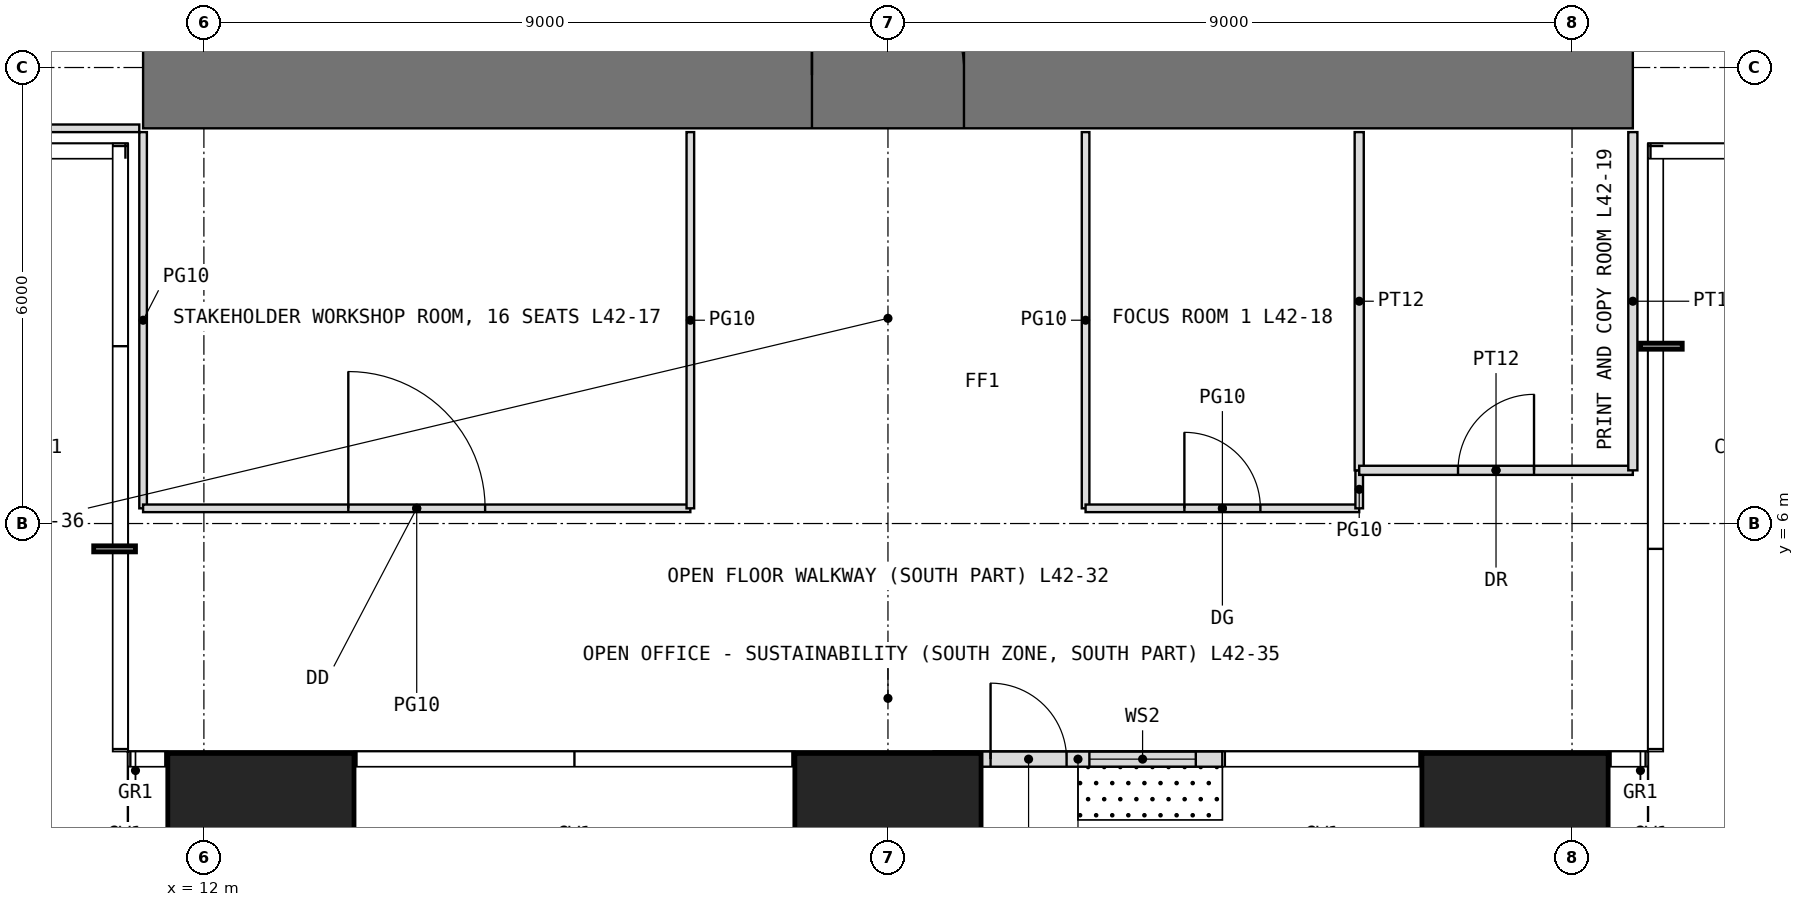
"""IFC4 building model, lengths in metres.
Left out: names, types, materials, properties, quantities, classifications, styles, units other than length and angle.
Written with IfcOpenShell. Run it as: python <this file> out.ifc"""

import sys

from ifc_helpers import new_model, si_unit, direction, frame, frame_2d, origin, origin_2d, place, context, subcontext, project, spatial, rectangle, extrude, element, fill, save


model = new_model("IFC4")
c1 = context("Model", 3, precision=1e-05, world=origin(), true_north=direction((0.0, 1.0)))
c2 = subcontext(c1, "Body", "Model", "MODEL_VIEW")
j1 = project(units=[si_unit("LENGTHUNIT", "METRE"), si_unit("PLANEANGLEUNIT", "RADIAN")], contexts=[c1])
p1 = place(None, origin())
s1 = spatial("IfcSite", under=j1, at=p1, CompositionType="ELEMENT")
p2 = place(p1, origin())
s2 = spatial("IfcBuilding", under=s1, at=p2, CompositionType="ELEMENT")
p3 = place(p2, frame((0.0, 0.0, 178.5)))
s3 = spatial("IfcBuildingStorey", under=s2, at=p3, CompositionType="ELEMENT", Elevation=178.5)
for number, where, z_axis, x_axis in (
    (1, (12.75, 1.75, 0.0), (0.0, 0.0, 1.0), (1.0, 0.0, 0.0)),
    (2, (21.0, 1.75, 0.0), (0.0, 0.0, 1.0), (1.0, 0.0, 0.0)),
    (3, (29.25, 1.75, 0.0), (0.0, 0.0, 1.0), (1.0, 0.0, 0.0)),
):
    element("IfcColumn", number, at=place(p3, frame(where, z_axis=z_axis, x_axis=x_axis)), inside=s3, PredefinedType="COLUMN", context=c2, shape_type="SweptSolid", body=[
        extrude(rectangle(XDim=2.45, YDim=2.45, at=origin_2d()), origin(), (0.0, 0.0, 1.0), 4.0),
    ])
p4 = place(p3, frame((21.6, 2.9, 0.0), z_axis=(0.0, 0.0, 1.0), x_axis=(1.0, 0.0, 0.0)))
e4 = element("IfcWall", 4, at=p4, inside=s3, PredefinedType="USERDEFINED", context=c2, shape_type="SweptSolid", body=[
    extrude(rectangle(XDim=3.8, YDim=0.2, at=frame_2d((1.9, 0.0))), origin(), (0.0, 0.0, 1.0), 3.75),
])
p5 = place(p4, frame((0.75, 0.0, 0.0)))
e5 = element("IfcOpeningElement", 5, at=p5, cuts=e4, PredefinedType="OPENING", context=c2, shape_type="SweptSolid", body=[
    extrude(rectangle(XDim=1.0, YDim=2.4, at=frame_2d((0.5, 1.2))), frame((0.0, 0.11, 0.0), z_axis=(0.0, -1.0, 0.0), x_axis=(1.0, 0.0, 0.0)), (0.0, 0.0, 1.0), 0.22),
])
p6 = place(p4, frame((2.05, 0.0, 0.3)))
e6 = element("IfcOpeningElement", 6, at=p6, cuts=e4, PredefinedType="OPENING", context=c2, shape_type="SweptSolid", body=[
    extrude(rectangle(XDim=1.4, YDim=2.7, at=frame_2d((0.7, 1.35))), frame((0.0, 0.11, 0.0), z_axis=(0.0, -1.0, 0.0), x_axis=(1.0, 0.0, 0.0)), (0.0, 0.0, 1.0), 0.22),
])
p7 = place(p3, frame((11.2, 11.9, -0.05), z_axis=(0.0, 0.0, 1.0), x_axis=(1.0, 0.0, 0.0)))
e7 = element("IfcWall", 7, at=p7, inside=s3, PredefinedType="SHEAR", context=c2, shape_type="SweptSolid", body=[
    extrude(rectangle(XDim=19.6, YDim=1.4, at=frame_2d((9.8, 0.0))), origin(), (0.0, 0.0, 1.0), 4.0),
])
p8 = place(p7, frame((8.8, 0.0, 0.05)))
e8 = element("IfcOpeningElement", 8, at=p8, cuts=e7, PredefinedType="OPENING", context=c2, shape_type="SweptSolid", body=[
    extrude(rectangle(XDim=2.0, YDim=2.2, at=frame_2d((1.0, 1.1))), frame((0.0, 0.71, 0.0), z_axis=(0.0, -1.0, 0.0), x_axis=(1.0, 0.0, 0.0)), (0.0, 0.0, 1.0), 1.42),
])
p9 = place(p3, frame((7.0, 11.2, 0.0), z_axis=(0.0, 0.0, 1.0), x_axis=(1.0, 0.0, 0.0)))
e9 = element("IfcWall", 9, at=p9, inside=s3, PredefinedType="PARTITIONING", context=c2, shape_type="SweptSolid", body=[
    extrude(rectangle(XDim=4.15, YDim=0.1, at=frame_2d((2.075, 0.0))), origin(), (0.0, 0.0, 1.0), 3.75),
])
p10 = place(p3, frame((11.2, 6.2, 0.0), z_axis=(0.0, 0.0, 1.0), x_axis=(0.0, 1.0, 0.0)))
e10 = element("IfcWall", 10, at=p10, inside=s3, PredefinedType="PARTITIONING", context=c2, shape_type="SweptSolid", body=[
    extrude(rectangle(XDim=4.95, YDim=0.1, at=frame_2d((2.475, 0.0))), origin(), (0.0, 0.0, 1.0), 3.75),
])
p11 = place(p3, frame((11.2, 6.2, 0.0), z_axis=(0.0, 0.0, 1.0), x_axis=(1.0, 0.0, 0.0)))
e11 = element("IfcWall", 11, at=p11, inside=s3, PredefinedType="PARTITIONING", context=c2, shape_type="SweptSolid", body=[
    extrude(rectangle(XDim=7.2, YDim=0.1, at=frame_2d((3.6, 0.0))), origin(), (0.0, 0.0, 1.0), 3.75),
])
p12 = place(p11, frame((2.7, 0.0, 0.0)))
e12 = element("IfcOpeningElement", 12, at=p12, cuts=e11, PredefinedType="OPENING", context=c2, shape_type="SweptSolid", body=[
    extrude(rectangle(XDim=1.8, YDim=2.4, at=frame_2d((0.9, 1.2))), frame((0.0, 0.06, 0.0), z_axis=(0.0, -1.0, 0.0), x_axis=(1.0, 0.0, 0.0)), (0.0, 0.0, 1.0), 0.12),
])
for number, where, z_axis, x_axis in (
    (13, (18.4, 6.2, 0.0), (0.0, 0.0, 1.0), (0.0, 1.0, 0.0)),
    (14, (23.6, 6.2, 0.0), (0.0, 0.0, 1.0), (0.0, 1.0, 0.0)),
):
    element("IfcWall", number, at=place(p3, frame(where, z_axis=z_axis, x_axis=x_axis)), inside=s3, PredefinedType="PARTITIONING", context=c2, shape_type="SweptSolid", body=[
        extrude(rectangle(XDim=4.95, YDim=0.1, at=frame_2d((2.475, 0.0))), origin(), (0.0, 0.0, 1.0), 3.75),
    ])
p13 = place(p3, frame((23.6, 6.2, 0.0), z_axis=(0.0, 0.0, 1.0), x_axis=(1.0, 0.0, 0.0)))
e15 = element("IfcWall", 15, at=p13, inside=s3, PredefinedType="PARTITIONING", context=c2, shape_type="SweptSolid", body=[
    extrude(rectangle(XDim=3.6, YDim=0.1, at=frame_2d((1.8, 0.0))), origin(), (0.0, 0.0, 1.0), 3.75),
])
p14 = place(p13, frame((1.3, 0.0, 0.0)))
e16 = element("IfcOpeningElement", 16, at=p14, cuts=e15, PredefinedType="OPENING", context=c2, shape_type="SweptSolid", body=[
    extrude(rectangle(XDim=1.0, YDim=2.4, at=frame_2d((0.5, 1.2))), frame((0.0, 0.06, 0.0), z_axis=(0.0, -1.0, 0.0), x_axis=(1.0, 0.0, 0.0)), (0.0, 0.0, 1.0), 0.12),
])
p15 = place(p3, frame((27.2, 6.2, 0.0), z_axis=(0.0, 0.0, 1.0), x_axis=(0.0, 1.0, 0.0)))
e17 = element("IfcWall", 17, at=p15, inside=s3, PredefinedType="PARTITIONING", context=c2, shape_type="SweptSolid", body=[
    extrude(rectangle(XDim=0.5, YDim=0.1, at=frame_2d((0.25, 0.0))), origin(), (0.0, 0.0, 1.0), 3.75),
])
p16 = place(p3, frame((27.2, 6.7, 0.0), z_axis=(0.0, 0.0, 1.0), x_axis=(0.0, 1.0, 0.0)))
e18 = element("IfcWall", 18, at=p16, inside=s3, PredefinedType="PARTITIONING", context=c2, shape_type="SweptSolid", body=[
    extrude(rectangle(XDim=4.45, YDim=0.12, at=frame_2d((2.225, 0.0))), origin(), (0.0, 0.0, 1.0), 3.75),
])
p17 = place(p3, frame((27.2, 6.7, 0.0), z_axis=(0.0, 0.0, 1.0), x_axis=(1.0, 0.0, 0.0)))
e19 = element("IfcWall", 19, at=p17, inside=s3, PredefinedType="PARTITIONING", context=c2, shape_type="SweptSolid", body=[
    extrude(rectangle(XDim=3.6, YDim=0.12, at=frame_2d((1.8, 0.0))), origin(), (0.0, 0.0, 1.0), 3.75),
])
p18 = place(p17, frame((1.3, 0.0, 0.0)))
e20 = element("IfcOpeningElement", 20, at=p18, cuts=e19, PredefinedType="OPENING", context=c2, shape_type="SweptSolid", body=[
    extrude(rectangle(XDim=1.0, YDim=2.2, at=frame_2d((0.5, 1.1))), frame((0.0, 0.07, 0.0), z_axis=(0.0, -1.0, 0.0), x_axis=(1.0, 0.0, 0.0)), (0.0, 0.0, 1.0), 0.14),
])
p19 = place(p3, frame((30.8, 6.7, 0.0), z_axis=(0.0, 0.0, 1.0), x_axis=(0.0, 1.0, 0.0)))
e21 = element("IfcWall", 21, at=p19, inside=s3, PredefinedType="PARTITIONING", context=c2, shape_type="SweptSolid", body=[
    extrude(rectangle(XDim=4.45, YDim=0.12, at=frame_2d((2.225, 0.0))), origin(), (0.0, 0.0, 1.0), 3.75),
])
p20 = place(p5, origin())
e22 = element("IfcDoor", 22, at=p20, inside=s3, OperationType="SINGLE_SWING_LEFT", PredefinedType="DOOR", context=c2, shape_type="SweptSolid", body=[
    extrude(rectangle(XDim=1.0, YDim=2.4, at=frame_2d((0.5, 1.2))), frame((0.0, 0.025, 0.0), z_axis=(0.0, -1.0, 0.0), x_axis=(1.0, 0.0, 0.0)), (0.0, 0.0, 1.0), 0.05),
])
fill(e5, e22)
p21 = place(p6, origin())
e23 = element("IfcWindow", 23, at=p21, inside=s3, PartitioningType="SINGLE_PANEL", PredefinedType="WINDOW", context=c2, shape_type="SweptSolid", body=[
    extrude(rectangle(XDim=1.4, YDim=2.7, at=frame_2d((0.7, 1.35))), frame((0.0, 0.03, 0.0), z_axis=(0.0, -1.0, 0.0), x_axis=(1.0, 0.0, 0.0)), (0.0, 0.0, 1.0), 0.06),
])
fill(e6, e23)
p22 = place(p8, origin())
e24 = element("IfcDoor", 24, at=p22, inside=s3, OperationType="DOUBLE_DOOR_SINGLE_SWING", PredefinedType="DOOR", context=c2, shape_type="SweptSolid", body=[
    extrude(rectangle(XDim=2.0, YDim=2.2, at=frame_2d((1.0, 1.1))), frame((0.0, 0.025, 0.0), z_axis=(0.0, -1.0, 0.0), x_axis=(1.0, 0.0, 0.0)), (0.0, 0.0, 1.0), 0.05),
])
fill(e8, e24)
p23 = place(p12, origin())
e25 = element("IfcDoor", 25, at=p23, inside=s3, OperationType="DOUBLE_DOOR_SINGLE_SWING", PredefinedType="DOOR", context=c2, shape_type="SweptSolid", body=[
    extrude(rectangle(XDim=1.8, YDim=2.4, at=frame_2d((0.9, 1.2))), frame((0.0, 0.025, 0.0), z_axis=(0.0, -1.0, 0.0), x_axis=(1.0, 0.0, 0.0)), (0.0, 0.0, 1.0), 0.05),
])
fill(e12, e25)
p24 = place(p14, origin())
e26 = element("IfcDoor", 26, at=p24, inside=s3, OperationType="SINGLE_SWING_LEFT", PredefinedType="DOOR", context=c2, shape_type="SweptSolid", body=[
    extrude(rectangle(XDim=1.0, YDim=2.4, at=frame_2d((0.5, 1.2))), frame((0.0, 0.025, 0.0), z_axis=(0.0, -1.0, 0.0), x_axis=(1.0, 0.0, 0.0)), (0.0, 0.0, 1.0), 0.05),
])
fill(e16, e26)
p25 = place(p18, origin())
e27 = element("IfcDoor", 27, at=p25, inside=s3, OperationType="SINGLE_SWING_RIGHT", PredefinedType="DOOR", context=c2, shape_type="SweptSolid", body=[
    extrude(rectangle(XDim=1.0, YDim=2.2, at=frame_2d((0.5, 1.1))), frame((0.0, 0.025, 0.0), z_axis=(0.0, -1.0, 0.0), x_axis=(1.0, 0.0, 0.0)), (0.0, 0.0, 1.0), 0.05),
])
fill(e20, e27)
save(model, sys.argv[1])
